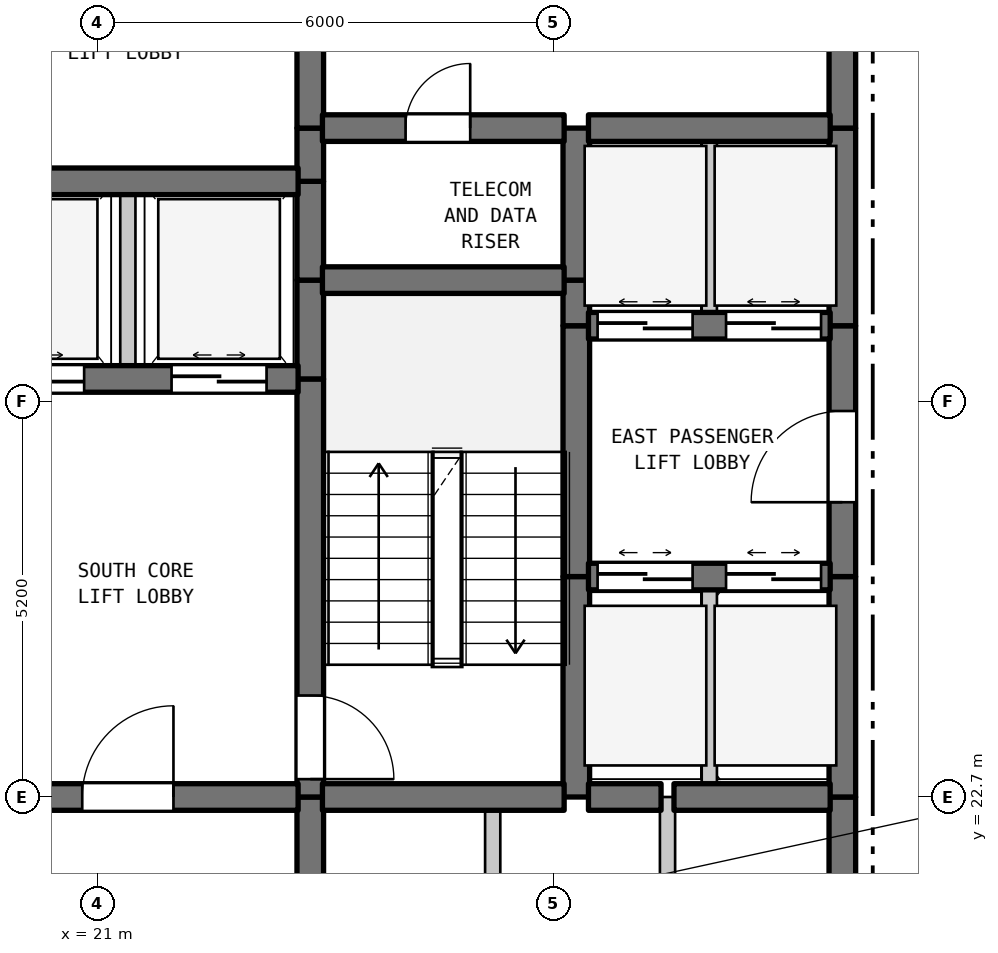
"""IFC4 building model, lengths in metres.
Left out: names, types, materials, properties, quantities, classifications, styles, units other than length and angle.
Written with IfcOpenShell. Run it as: python <this file> out.ifc"""

import sys

from ifc_helpers import new_model, si_unit, direction, frame, frame_2d, origin, place, context, subcontext, project, spatial, rectangle, extrude, element, fill, save


model = new_model("IFC4")
c1 = context("Model", 3, precision=1e-05, world=origin(), true_north=direction((0.0, 1.0)))
c2 = subcontext(c1, "Body", "Model", "MODEL_VIEW")
j1 = project(units=[si_unit("LENGTHUNIT", "METRE"), si_unit("PLANEANGLEUNIT", "RADIAN")], contexts=[c1])
p1 = place(None, origin())
s1 = spatial("IfcSite", under=j1, at=p1, CompositionType="ELEMENT")
p2 = place(p1, origin())
s2 = spatial("IfcBuilding", under=s1, at=p2, CompositionType="ELEMENT")
p3 = place(p2, frame((0.0, 0.0, 180.2)))
s3 = spatial("IfcBuildingStorey", under=s2, at=p3, CompositionType="ELEMENT", Elevation=180.2)
p4 = place(p3, frame((21.4, 28.2, 0.0), z_axis=(0.0, 0.0, 1.0), x_axis=(0.0, 1.0, 0.0)))
e1 = element("IfcWall", 1, at=p4, inside=s3, PredefinedType="STANDARD", context=c2, shape_type="SweptSolid", body=[
    extrude(rectangle(XDim=2.6, YDim=0.2, at=frame_2d((1.3, 0.0))), origin(), (0.0, 0.0, 1.0), 3.38),
])
p5 = place(p3, frame((23.8, 19.5, 0.0), z_axis=(0.0, 0.0, 1.0), x_axis=(0.0, 1.0, 0.0)))
e2 = element("IfcWall", 2, at=p5, inside=s3, PredefinedType="SHEAR", context=c2, shape_type="SweptSolid", body=[
    extrude(rectangle(XDim=3.2, YDim=0.35, at=frame_2d((1.6, 0.0))), origin(), (0.0, 0.0, 1.0), 3.38),
])
p6 = place(p3, frame((23.8, 22.7, 0.0), z_axis=(0.0, 0.0, 1.0), x_axis=(0.0, 1.0, 0.0)))
e3 = element("IfcWall", 3, at=p6, inside=s3, PredefinedType="SHEAR", context=c2, shape_type="SweptSolid", body=[
    extrude(rectangle(XDim=5.5, YDim=0.35, at=frame_2d((2.75, 0.0))), origin(), (0.0, 0.0, 1.0), 3.38),
])
p7 = place(p6, frame((0.235, 0.0, 0.0)))
e4 = element("IfcOpeningElement", 4, at=p7, cuts=e3, PredefinedType="OPENING", context=c2, shape_type="SweptSolid", body=[
    extrude(rectangle(XDim=1.1, YDim=2.15, at=frame_2d((0.55, 1.075))), frame((0.0, 0.185, 0.0), z_axis=(0.0, -1.0, 0.0), x_axis=(1.0, 0.0, 0.0)), (0.0, 0.0, 1.0), 0.37),
])
for number, where, z_axis, x_axis in (
    (5, (23.8, 28.2, 0.0), (0.0, 0.0, 1.0), (0.0, 1.0, 0.0)),
    (6, (23.8, 29.5, 0.0), (0.0, 0.0, 1.0), (0.0, 1.0, 0.0)),
):
    element("IfcWall", number, at=place(p3, frame(where, z_axis=z_axis, x_axis=x_axis)), inside=s3, PredefinedType="SHEAR", context=c2, shape_type="SweptSolid", body=[
        extrude(rectangle(XDim=1.3, YDim=0.35, at=frame_2d((0.65, 0.0))), origin(), (0.0, 0.0, 1.0), 3.38),
    ])
p8 = place(p3, frame((23.8, 30.8, 0.0), z_axis=(0.0, 0.0, 1.0), x_axis=(0.0, 1.0, 0.0)))
e7 = element("IfcWall", 7, at=p8, inside=s3, PredefinedType="SHEAR", context=c2, shape_type="SweptSolid", body=[
    extrude(rectangle(XDim=0.7, YDim=0.35, at=frame_2d((0.35, 0.0))), origin(), (0.0, 0.0, 1.0), 3.38),
])
p9 = place(p3, frame((23.8, 31.5, 0.0), z_axis=(0.0, 0.0, 1.0), x_axis=(0.0, 1.0, 0.0)))
e8 = element("IfcWall", 8, at=p9, inside=s3, PredefinedType="SHEAR", context=c2, shape_type="SweptSolid", body=[
    extrude(rectangle(XDim=3.5, YDim=0.35, at=frame_2d((1.75, 0.0))), origin(), (0.0, 0.0, 1.0), 3.38),
])
p10 = place(p9, frame((1.127, 0.0, 0.0)))
e9 = element("IfcOpeningElement", 9, at=p10, cuts=e8, PredefinedType="OPENING", context=c2, shape_type="SweptSolid", body=[
    extrude(rectangle(XDim=1.1, YDim=2.15, at=frame_2d((0.55, 1.075))), frame((0.0, 0.185, 0.0), z_axis=(0.0, -1.0, 0.0), x_axis=(1.0, 0.0, 0.0)), (0.0, 0.0, 1.0), 0.37),
])
p11 = place(p3, frame((26.2, 19.5, 0.0), z_axis=(0.0, 0.0, 1.0), x_axis=(0.0, 1.0, 0.0)))
e10 = element("IfcWall", 10, at=p11, inside=s3, PredefinedType="STANDARD", context=c2, shape_type="SweptSolid", body=[
    extrude(rectangle(XDim=3.2, YDim=0.2, at=frame_2d((1.6, 0.0))), origin(), (0.0, 0.0, 1.0), 3.38),
])
p12 = place(p3, frame((27.3, 22.7, 0.0), z_axis=(0.0, 0.0, 1.0), x_axis=(0.0, 1.0, 0.0)))
e11 = element("IfcWall", 11, at=p12, inside=s3, PredefinedType="SHEAR", context=c2, shape_type="SweptSolid", body=[
    extrude(rectangle(XDim=2.9, YDim=0.35, at=frame_2d((1.45, 0.0))), origin(), (0.0, 0.0, 1.0), 3.38),
])
p13 = place(p3, frame((27.3, 25.6, 0.0), z_axis=(0.0, 0.0, 1.0), x_axis=(0.0, 1.0, 0.0)))
e12 = element("IfcWall", 12, at=p13, inside=s3, PredefinedType="SHEAR", context=c2, shape_type="SweptSolid", body=[
    extrude(rectangle(XDim=3.3, YDim=0.35, at=frame_2d((1.65, 0.0))), origin(), (0.0, 0.0, 1.0), 3.38),
])
p14 = place(p3, frame((27.3, 28.9, 0.0), z_axis=(0.0, 0.0, 1.0), x_axis=(0.0, 1.0, 0.0)))
e13 = element("IfcWall", 13, at=p14, inside=s3, PredefinedType="SHEAR", context=c2, shape_type="SweptSolid", body=[
    extrude(rectangle(XDim=0.6, YDim=0.35, at=frame_2d((0.3, 0.0))), origin(), (0.0, 0.0, 1.0), 3.38),
])
p15 = place(p3, frame((27.3, 29.5, 0.0), z_axis=(0.0, 0.0, 1.0), x_axis=(0.0, 1.0, 0.0)))
e14 = element("IfcWall", 14, at=p15, inside=s3, PredefinedType="SHEAR", context=c2, shape_type="SweptSolid", body=[
    extrude(rectangle(XDim=2.0, YDim=0.35, at=frame_2d((1.0, 0.0))), origin(), (0.0, 0.0, 1.0), 3.38),
])
p16 = place(p3, frame((28.5, 19.5, 0.0), z_axis=(0.0, 0.0, 1.0), x_axis=(0.0, 1.0, 0.0)))
e15 = element("IfcWall", 15, at=p16, inside=s3, PredefinedType="STANDARD", context=c2, shape_type="SweptSolid", body=[
    extrude(rectangle(XDim=3.2, YDim=0.2, at=frame_2d((1.6, 0.0))), origin(), (0.0, 0.0, 1.0), 3.38),
])
p17 = place(p3, frame((29.05, 22.7, 0.0), z_axis=(0.0, 0.0, 1.0), x_axis=(0.0, 1.0, 0.0)))
e16 = element("IfcWall", 16, at=p17, inside=s3, PredefinedType="STANDARD", context=c2, shape_type="SweptSolid", body=[
    extrude(rectangle(XDim=2.9, YDim=0.2, at=frame_2d((1.45, 0.0))), origin(), (0.0, 0.0, 1.0), 3.38),
])
p18 = place(p3, frame((29.05, 28.9, 0.0), z_axis=(0.0, 0.0, 1.0), x_axis=(0.0, 1.0, 0.0)))
e17 = element("IfcWall", 17, at=p18, inside=s3, PredefinedType="STANDARD", context=c2, shape_type="SweptSolid", body=[
    extrude(rectangle(XDim=2.6, YDim=0.2, at=frame_2d((1.3, 0.0))), origin(), (0.0, 0.0, 1.0), 3.38),
])
p19 = place(p3, frame((30.8, 19.5, 0.0), z_axis=(0.0, 0.0, 1.0), x_axis=(0.0, 1.0, 0.0)))
e18 = element("IfcWall", 18, at=p19, inside=s3, PredefinedType="SHEAR", context=c2, shape_type="SweptSolid", body=[
    extrude(rectangle(XDim=3.2, YDim=0.35, at=frame_2d((1.6, 0.0))), origin(), (0.0, 0.0, 1.0), 3.38),
])
p20 = place(p3, frame((30.8, 22.7, 0.0), z_axis=(0.0, 0.0, 1.0), x_axis=(0.0, 1.0, 0.0)))
e19 = element("IfcWall", 19, at=p20, inside=s3, PredefinedType="SHEAR", context=c2, shape_type="SweptSolid", body=[
    extrude(rectangle(XDim=2.9, YDim=0.35, at=frame_2d((1.45, 0.0))), origin(), (0.0, 0.0, 1.0), 3.38),
])
p21 = place(p3, frame((30.8, 25.6, 0.0), z_axis=(0.0, 0.0, 1.0), x_axis=(0.0, 1.0, 0.0)))
e20 = element("IfcWall", 20, at=p21, inside=s3, PredefinedType="SHEAR", context=c2, shape_type="SweptSolid", body=[
    extrude(rectangle(XDim=3.3, YDim=0.35, at=frame_2d((1.65, 0.0))), origin(), (0.0, 0.0, 1.0), 3.38),
])
p22 = place(p21, frame((0.978, 0.0, 0.0)))
e21 = element("IfcOpeningElement", 21, at=p22, cuts=e20, PredefinedType="OPENING", context=c2, shape_type="SweptSolid", body=[
    extrude(rectangle(XDim=1.2, YDim=2.2, at=frame_2d((0.6, 1.1))), frame((0.0, 0.185, 0.0), z_axis=(0.0, -1.0, 0.0), x_axis=(1.0, 0.0, 0.0)), (0.0, 0.0, 1.0), 0.37),
])
p23 = place(p3, frame((30.8, 28.9, 0.0), z_axis=(0.0, 0.0, 1.0), x_axis=(0.0, 1.0, 0.0)))
e22 = element("IfcWall", 22, at=p23, inside=s3, PredefinedType="SHEAR", context=c2, shape_type="SweptSolid", body=[
    extrude(rectangle(XDim=2.6, YDim=0.35, at=frame_2d((1.3, 0.0))), origin(), (0.0, 0.0, 1.0), 3.38),
])
p24 = place(p3, frame((30.8, 31.5, 0.0), z_axis=(0.0, 0.0, 1.0), x_axis=(0.0, 1.0, 0.0)))
e23 = element("IfcWall", 23, at=p24, inside=s3, PredefinedType="SHEAR", context=c2, shape_type="SweptSolid", body=[
    extrude(rectangle(XDim=3.5, YDim=0.35, at=frame_2d((1.75, 0.0))), origin(), (0.0, 0.0, 1.0), 3.38),
])
p25 = place(p24, frame((1.15, 0.0, 0.0)))
e24 = element("IfcOpeningElement", 24, at=p25, cuts=e23, PredefinedType="OPENING", context=c2, shape_type="SweptSolid", body=[
    extrude(rectangle(XDim=1.2, YDim=2.2, at=frame_2d((0.6, 1.1))), frame((0.0, 0.185, 0.0), z_axis=(0.0, -1.0, 0.0), x_axis=(1.0, 0.0, 0.0)), (0.0, 0.0, 1.0), 0.37),
])
p26 = place(p3, frame((19.16, 22.7, 0.0), z_axis=(0.0, 0.0, 1.0), x_axis=(1.0, 0.0, 0.0)))
e25 = element("IfcWall", 25, at=p26, inside=s3, PredefinedType="SHEAR", context=c2, shape_type="SweptSolid", body=[
    extrude(rectangle(XDim=4.48, YDim=0.35, at=frame_2d((2.24, 0.0))), origin(), (0.0, 0.0, 1.0), 3.38),
])
p27 = place(p26, frame((1.64, 0.0, 0.0)))
e26 = element("IfcOpeningElement", 26, at=p27, cuts=e25, PredefinedType="OPENING", context=c2, shape_type="SweptSolid", body=[
    extrude(rectangle(XDim=1.2, YDim=2.2, at=frame_2d((0.6, 1.1))), frame((0.0, 0.185, 0.0), z_axis=(0.0, -1.0, 0.0), x_axis=(1.0, 0.0, 0.0)), (0.0, 0.0, 1.0), 0.37),
])
p28 = place(p3, frame((23.96, 22.7, 0.0), z_axis=(0.0, 0.0, 1.0), x_axis=(1.0, 0.0, 0.0)))
e27 = element("IfcWall", 27, at=p28, inside=s3, PredefinedType="SHEAR", context=c2, shape_type="SweptSolid", body=[
    extrude(rectangle(XDim=3.18, YDim=0.35, at=frame_2d((1.59, 0.0))), origin(), (0.0, 0.0, 1.0), 3.38),
])
p29 = place(p3, frame((27.46, 22.7, 0.0), z_axis=(0.0, 0.0, 1.0), x_axis=(1.0, 0.0, 0.0)))
e28 = element("IfcWall", 28, at=p29, inside=s3, PredefinedType="SHEAR", context=c2, shape_type="SweptSolid", body=[
    extrude(rectangle(XDim=0.955, YDim=0.35, at=frame_2d((0.478, 0.0))), origin(), (0.0, 0.0, 1.0), 3.38),
])
p30 = place(p3, frame((28.585, 22.7, 0.0), z_axis=(0.0, 0.0, 1.0), x_axis=(1.0, 0.0, 0.0)))
e29 = element("IfcWall", 29, at=p30, inside=s3, PredefinedType="SHEAR", context=c2, shape_type="SweptSolid", body=[
    extrude(rectangle(XDim=2.055, YDim=0.35, at=frame_2d((1.027, 0.0))), origin(), (0.0, 0.0, 1.0), 3.38),
])
p31 = place(p3, frame((27.46, 25.6, 0.0), z_axis=(0.0, 0.0, 1.0), x_axis=(1.0, 0.0, 0.0)))
e30 = element("IfcWall", 30, at=p31, inside=s3, PredefinedType="SHEAR", context=c2, shape_type="SweptSolid", body=[
    extrude(rectangle(XDim=3.18, YDim=0.35, at=frame_2d((1.59, 0.0))), origin(), (0.0, 0.0, 1.0), 3.38),
])
p32 = place(p31, frame((0.12, 0.0, 0.0)))
e31 = element("IfcOpeningElement", 31, at=p32, cuts=e30, PredefinedType="OPENING", context=c2, shape_type="SweptSolid", body=[
    extrude(rectangle(XDim=1.25, YDim=2.2, at=frame_2d((0.625, 1.1))), frame((0.0, 0.185, 0.0), z_axis=(0.0, -1.0, 0.0), x_axis=(1.0, 0.0, 0.0)), (0.0, 0.0, 1.0), 0.37),
])
p33 = place(p31, frame((1.81, 0.0, 0.0)))
e32 = element("IfcOpeningElement", 32, at=p33, cuts=e30, PredefinedType="OPENING", context=c2, shape_type="SweptSolid", body=[
    extrude(rectangle(XDim=1.25, YDim=2.2, at=frame_2d((0.625, 1.1))), frame((0.0, 0.185, 0.0), z_axis=(0.0, -1.0, 0.0), x_axis=(1.0, 0.0, 0.0)), (0.0, 0.0, 1.0), 0.37),
])
p34 = place(p3, frame((19.16, 28.2, 0.0), z_axis=(0.0, 0.0, 1.0), x_axis=(1.0, 0.0, 0.0)))
e33 = element("IfcWall", 33, at=p34, inside=s3, PredefinedType="SHEAR", context=c2, shape_type="SweptSolid", body=[
    extrude(rectangle(XDim=4.48, YDim=0.35, at=frame_2d((2.24, 0.0))), origin(), (0.0, 0.0, 1.0), 3.38),
])
p35 = place(p34, frame((0.415, 0.0, 0.0)))
e34 = element("IfcOpeningElement", 34, at=p35, cuts=e33, PredefinedType="OPENING", context=c2, shape_type="SweptSolid", body=[
    extrude(rectangle(XDim=1.25, YDim=2.2, at=frame_2d((0.625, 1.1))), frame((0.0, 0.185, 0.0), z_axis=(0.0, -1.0, 0.0), x_axis=(1.0, 0.0, 0.0)), (0.0, 0.0, 1.0), 0.37),
])
p36 = place(p34, frame((2.815, 0.0, 0.0)))
e35 = element("IfcOpeningElement", 35, at=p36, cuts=e33, PredefinedType="OPENING", context=c2, shape_type="SweptSolid", body=[
    extrude(rectangle(XDim=1.25, YDim=2.2, at=frame_2d((0.625, 1.1))), frame((0.0, 0.185, 0.0), z_axis=(0.0, -1.0, 0.0), x_axis=(1.0, 0.0, 0.0)), (0.0, 0.0, 1.0), 0.37),
])
p37 = place(p3, frame((27.46, 28.9, 0.0), z_axis=(0.0, 0.0, 1.0), x_axis=(1.0, 0.0, 0.0)))
e36 = element("IfcWall", 36, at=p37, inside=s3, PredefinedType="SHEAR", context=c2, shape_type="SweptSolid", body=[
    extrude(rectangle(XDim=3.18, YDim=0.35, at=frame_2d((1.59, 0.0))), origin(), (0.0, 0.0, 1.0), 3.38),
])
p38 = place(p37, frame((0.12, 0.0, 0.0)))
e37 = element("IfcOpeningElement", 37, at=p38, cuts=e36, PredefinedType="OPENING", context=c2, shape_type="SweptSolid", body=[
    extrude(rectangle(XDim=1.25, YDim=2.2, at=frame_2d((0.625, 1.1))), frame((0.0, 0.185, 0.0), z_axis=(0.0, -1.0, 0.0), x_axis=(1.0, 0.0, 0.0)), (0.0, 0.0, 1.0), 0.37),
])
p39 = place(p37, frame((1.81, 0.0, 0.0)))
e38 = element("IfcOpeningElement", 38, at=p39, cuts=e36, PredefinedType="OPENING", context=c2, shape_type="SweptSolid", body=[
    extrude(rectangle(XDim=1.25, YDim=2.2, at=frame_2d((0.625, 1.1))), frame((0.0, 0.185, 0.0), z_axis=(0.0, -1.0, 0.0), x_axis=(1.0, 0.0, 0.0)), (0.0, 0.0, 1.0), 0.37),
])
p40 = place(p3, frame((23.96, 29.5, 0.0), z_axis=(0.0, 0.0, 1.0), x_axis=(1.0, 0.0, 0.0)))
e39 = element("IfcWall", 39, at=p40, inside=s3, PredefinedType="SHEAR", context=c2, shape_type="SweptSolid", body=[
    extrude(rectangle(XDim=3.18, YDim=0.35, at=frame_2d((1.59, 0.0))), origin(), (0.0, 0.0, 1.0), 3.38),
])
p41 = place(p3, frame((19.16, 30.8, 0.0), z_axis=(0.0, 0.0, 1.0), x_axis=(1.0, 0.0, 0.0)))
e40 = element("IfcWall", 40, at=p41, inside=s3, PredefinedType="SHEAR", context=c2, shape_type="SweptSolid", body=[
    extrude(rectangle(XDim=4.48, YDim=0.35, at=frame_2d((2.24, 0.0))), origin(), (0.0, 0.0, 1.0), 3.38),
])
p42 = place(p3, frame((23.96, 31.5, 0.0), z_axis=(0.0, 0.0, 1.0), x_axis=(1.0, 0.0, 0.0)))
e41 = element("IfcWall", 41, at=p42, inside=s3, PredefinedType="SHEAR", context=c2, shape_type="SweptSolid", body=[
    extrude(rectangle(XDim=3.18, YDim=0.35, at=frame_2d((1.59, 0.0))), origin(), (0.0, 0.0, 1.0), 3.38),
])
p43 = place(p42, frame((1.094, 0.0, 0.0)))
e42 = element("IfcOpeningElement", 42, at=p43, cuts=e41, PredefinedType="OPENING", context=c2, shape_type="SweptSolid", body=[
    extrude(rectangle(XDim=0.85, YDim=2.1, at=frame_2d((0.425, 1.05))), frame((0.0, 0.185, 0.0), z_axis=(0.0, -1.0, 0.0), x_axis=(1.0, 0.0, 0.0)), (0.0, 0.0, 1.0), 0.37),
])
p44 = place(p3, frame((27.46, 31.5, 0.0), z_axis=(0.0, 0.0, 1.0), x_axis=(1.0, 0.0, 0.0)))
e43 = element("IfcWall", 43, at=p44, inside=s3, PredefinedType="SHEAR", context=c2, shape_type="SweptSolid", body=[
    extrude(rectangle(XDim=3.18, YDim=0.35, at=frame_2d((1.59, 0.0))), origin(), (0.0, 0.0, 1.0), 3.38),
])
p45 = place(p7, frame((1.1, 0.0, 0.0), z_axis=(0.0, 0.0, 1.0), x_axis=(-1.0, 0.0, 0.0)))
e44 = element("IfcDoor", 44, at=p45, inside=s3, OperationType="SINGLE_SWING_LEFT", PredefinedType="DOOR", context=c2, shape_type="SweptSolid", body=[
    extrude(rectangle(XDim=1.1, YDim=2.15, at=frame_2d((0.55, 1.075))), frame((0.0, 0.025, 0.0), z_axis=(0.0, -1.0, 0.0), x_axis=(1.0, 0.0, 0.0)), (0.0, 0.0, 1.0), 0.05),
])
fill(e4, e44)
p46 = place(p22, origin())
e45 = element("IfcDoor", 45, at=p46, inside=s3, OperationType="SINGLE_SWING_LEFT", PredefinedType="DOOR", context=c2, shape_type="SweptSolid", body=[
    extrude(rectangle(XDim=1.2, YDim=2.2, at=frame_2d((0.6, 1.1))), frame((0.0, 0.025, 0.0), z_axis=(0.0, -1.0, 0.0), x_axis=(1.0, 0.0, 0.0)), (0.0, 0.0, 1.0), 0.05),
])
fill(e21, e45)
p47 = place(p27, origin())
e46 = element("IfcDoor", 46, at=p47, inside=s3, OperationType="SINGLE_SWING_RIGHT", PredefinedType="DOOR", context=c2, shape_type="SweptSolid", body=[
    extrude(rectangle(XDim=1.2, YDim=2.2, at=frame_2d((0.6, 1.1))), frame((0.0, 0.025, 0.0), z_axis=(0.0, -1.0, 0.0), x_axis=(1.0, 0.0, 0.0)), (0.0, 0.0, 1.0), 0.05),
])
fill(e26, e46)
p48 = place(p32, origin())
e47 = element("IfcDoor", 47, at=p48, inside=s3, OperationType="DOUBLE_DOOR_SLIDING", PredefinedType="DOOR", context=c2, shape_type="SweptSolid", body=[
    extrude(rectangle(XDim=1.25, YDim=2.2, at=frame_2d((0.625, 1.1))), frame((0.0, 0.025, 0.0), z_axis=(0.0, -1.0, 0.0), x_axis=(1.0, 0.0, 0.0)), (0.0, 0.0, 1.0), 0.05),
])
fill(e31, e47)
p49 = place(p33, origin())
e48 = element("IfcDoor", 48, at=p49, inside=s3, OperationType="DOUBLE_DOOR_SLIDING", PredefinedType="DOOR", context=c2, shape_type="SweptSolid", body=[
    extrude(rectangle(XDim=1.25, YDim=2.2, at=frame_2d((0.625, 1.1))), frame((0.0, 0.025, 0.0), z_axis=(0.0, -1.0, 0.0), x_axis=(1.0, 0.0, 0.0)), (0.0, 0.0, 1.0), 0.05),
])
fill(e32, e48)
p50 = place(p35, origin())
e49 = element("IfcDoor", 49, at=p50, inside=s3, OperationType="DOUBLE_DOOR_SLIDING", PredefinedType="DOOR", context=c2, shape_type="SweptSolid", body=[
    extrude(rectangle(XDim=1.25, YDim=2.2, at=frame_2d((0.625, 1.1))), frame((0.0, 0.025, 0.0), z_axis=(0.0, -1.0, 0.0), x_axis=(1.0, 0.0, 0.0)), (0.0, 0.0, 1.0), 0.05),
])
fill(e34, e49)
p51 = place(p36, origin())
e50 = element("IfcDoor", 50, at=p51, inside=s3, OperationType="DOUBLE_DOOR_SLIDING", PredefinedType="DOOR", context=c2, shape_type="SweptSolid", body=[
    extrude(rectangle(XDim=1.25, YDim=2.2, at=frame_2d((0.625, 1.1))), frame((0.0, 0.025, 0.0), z_axis=(0.0, -1.0, 0.0), x_axis=(1.0, 0.0, 0.0)), (0.0, 0.0, 1.0), 0.05),
])
fill(e35, e50)
p52 = place(p38, origin())
e51 = element("IfcDoor", 51, at=p52, inside=s3, OperationType="DOUBLE_DOOR_SLIDING", PredefinedType="DOOR", context=c2, shape_type="SweptSolid", body=[
    extrude(rectangle(XDim=1.25, YDim=2.2, at=frame_2d((0.625, 1.1))), frame((0.0, 0.025, 0.0), z_axis=(0.0, -1.0, 0.0), x_axis=(1.0, 0.0, 0.0)), (0.0, 0.0, 1.0), 0.05),
])
fill(e37, e51)
p53 = place(p39, origin())
e52 = element("IfcDoor", 52, at=p53, inside=s3, OperationType="DOUBLE_DOOR_SLIDING", PredefinedType="DOOR", context=c2, shape_type="SweptSolid", body=[
    extrude(rectangle(XDim=1.25, YDim=2.2, at=frame_2d((0.625, 1.1))), frame((0.0, 0.025, 0.0), z_axis=(0.0, -1.0, 0.0), x_axis=(1.0, 0.0, 0.0)), (0.0, 0.0, 1.0), 0.05),
])
fill(e38, e52)
p54 = place(p43, origin())
e53 = element("IfcDoor", 53, at=p54, inside=s3, OperationType="SINGLE_SWING_RIGHT", PredefinedType="DOOR", context=c2, shape_type="SweptSolid", body=[
    extrude(rectangle(XDim=0.85, YDim=2.1, at=frame_2d((0.425, 1.05))), frame((0.0, 0.025, 0.0), z_axis=(0.0, -1.0, 0.0), x_axis=(1.0, 0.0, 0.0)), (0.0, 0.0, 1.0), 0.05),
])
fill(e42, e53)
save(model, sys.argv[1])
